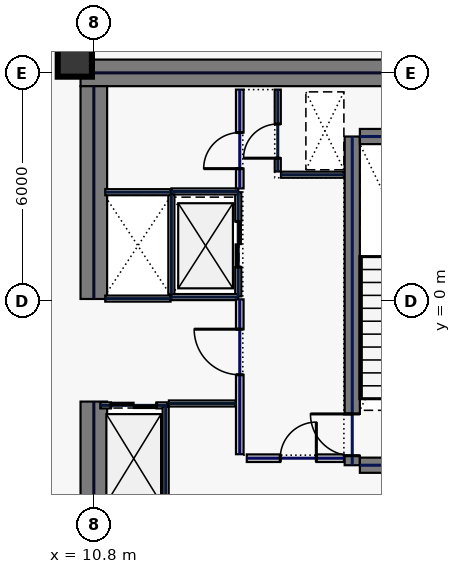
"""IFC4 building model, lengths in metres.
Left out: names, types, materials, properties, quantities, classifications, styles, units other than length and angle.
Written with IfcOpenShell. Run it as: python <this file> out.ifc"""

import sys

from ifc_helpers import new_model, si_unit, direction, frame, frame_2d, origin, origin_2d, place, context, subcontext, project, spatial, rectangle, hollow_rectangle, extrude, element, fill, save


model = new_model("IFC4")
c1 = context("Model", 3, precision=1e-05, world=origin(), true_north=direction((0.0, 1.0)))
c2 = subcontext(c1, "Body", "Model", "MODEL_VIEW")
j1 = project(units=[si_unit("LENGTHUNIT", "METRE"), si_unit("PLANEANGLEUNIT", "RADIAN")], contexts=[c1])
p1 = place(None, origin())
s1 = spatial("IfcSite", under=j1, at=p1, CompositionType="ELEMENT")
p2 = place(p1, origin())
s2 = spatial("IfcBuilding", under=s1, at=p2, CompositionType="ELEMENT")
p3 = place(p2, frame((0.0, 0.0, 176.2)))
s3 = spatial("IfcBuildingStorey", under=s2, at=p3, CompositionType="ELEMENT", Elevation=176.2)
p4 = place(p3, frame((10.45, 6.0, 0.0), z_axis=(0.0, 0.0, 1.0), x_axis=(1.0, 0.0, 0.0)))
e1 = element("IfcWall", 1, at=p4, inside=s3, PredefinedType="SHEAR", context=c2, shape_type="SweptSolid", body=[
    extrude(rectangle(XDim=11.55, YDim=0.7, at=frame_2d((5.775, 0.0))), origin(), (0.0, 0.0, 1.0), 3.74),
])
p5 = place(p3, frame((10.8, -5.65, 0.0), z_axis=(0.0, 0.0, 1.0), x_axis=(0.0, 1.0, 0.0)))
e2 = element("IfcWall", 2, at=p5, inside=s3, PredefinedType="SHEAR", context=c2, shape_type="SweptSolid", body=[
    extrude(rectangle(XDim=3.0, YDim=0.7, at=frame_2d((1.5, 0.0))), origin(), (0.0, 0.0, 1.0), 3.74),
])
p6 = place(p3, frame((10.8, 0.05, 0.0), z_axis=(0.0, 0.0, 1.0), x_axis=(0.0, 1.0, 0.0)))
e3 = element("IfcWall", 3, at=p6, inside=s3, PredefinedType="SHEAR", context=c2, shape_type="SweptSolid", body=[
    extrude(rectangle(XDim=5.6, YDim=0.7, at=frame_2d((2.8, 0.0))), origin(), (0.0, 0.0, 1.0), 3.74),
])
p7 = place(p3, frame((17.6, -4.325, 0.0), z_axis=(0.0, 0.0, 1.0), x_axis=(0.0, 1.0, 0.0)))
e4 = element("IfcWall", 4, at=p7, inside=s3, PredefinedType="SHEAR", context=c2, shape_type="SweptSolid", body=[
    extrude(rectangle(XDim=8.65, YDim=0.4, at=frame_2d((4.325, 0.0))), origin(), (0.0, 0.0, 1.0), 3.74),
])
p8 = place(p7, frame((0.25, 0.0, 0.0)))
e5 = element("IfcOpeningElement", 5, at=p8, cuts=e4, PredefinedType="OPENING", context=c2, shape_type="SweptSolid", body=[
    extrude(rectangle(XDim=1.1, YDim=2.2, at=frame_2d((0.55, 1.1))), frame((0.0, 0.21, 0.0), z_axis=(0.0, -1.0, 0.0), x_axis=(1.0, 0.0, 0.0)), (0.0, 0.0, 1.0), 0.42),
])
for number, where, z_axis, x_axis in (
    (6, (17.8, -4.325, 0.0), (0.0, 0.0, 1.0), (1.0, 0.0, 0.0)),
    (7, (17.8, 4.325, 0.0), (0.0, 0.0, 1.0), (1.0, 0.0, 0.0)),
):
    element("IfcWall", number, at=place(p3, frame(where, z_axis=z_axis, x_axis=x_axis)), inside=s3, PredefinedType="SHEAR", context=c2, shape_type="SweptSolid", body=[
        extrude(rectangle(XDim=3.4, YDim=0.4, at=frame_2d((1.7, 0.0))), origin(), (0.0, 0.0, 1.0), 3.74),
    ])
p9 = place(p3, frame((10.3, 6.35, 0.0), z_axis=(0.0, 0.0, 1.0), x_axis=(1.0, 0.0, 0.0)))
e8 = element("IfcColumn", 8, at=p9, inside=s3, PredefinedType="COLUMN", context=c2, shape_type="SweptSolid", body=[
    extrude(hollow_rectangle(XDim=0.9, YDim=0.9, WallThickness=0.04, at=origin_2d()), origin(), (0.0, 0.0, 1.0), 3.74),
])
p10 = place(p3, frame((14.6, 0.12, 0.0), z_axis=(0.0, 0.0, 1.0), x_axis=(0.0, 1.0, 0.0)))
e9 = element("IfcWall", 9, at=p10, inside=s3, PredefinedType="PARTITIONING", context=c2, shape_type="SweptSolid", body=[
    extrude(rectangle(XDim=2.74, YDim=0.16, at=frame_2d((1.37, 0.0))), origin(), (0.0, 0.0, 1.0), 3.74),
])
p11 = place(p10, frame((0.77, 0.0, 0.0)))
e10 = element("IfcOpeningElement", 10, at=p11, cuts=e9, PredefinedType="OPENING", context=c2, shape_type="SweptSolid", body=[
    extrude(rectangle(XDim=1.2, YDim=2.2, at=frame_2d((0.6, 1.1))), frame((0.0, 0.09, 0.0), z_axis=(0.0, -1.0, 0.0), x_axis=(1.0, 0.0, 0.0)), (0.0, 0.0, 1.0), 0.18),
])
for number, where, z_axis, x_axis in (
    (11, (12.84, 0.1, 0.0), (0.0, 0.0, 1.0), (1.0, 0.0, 0.0)),
    (12, (12.84, 2.88, 0.0), (0.0, 0.0, 1.0), (1.0, 0.0, 0.0)),
):
    element("IfcWall", number, at=place(p3, frame(where, z_axis=z_axis, x_axis=x_axis)), inside=s3, PredefinedType="PARTITIONING", context=c2, shape_type="SweptSolid", body=[
        extrude(rectangle(XDim=1.76, YDim=0.16, at=frame_2d((0.88, 0.0))), origin(), (0.0, 0.0, 1.0), 3.74),
    ])
p12 = place(p3, frame((12.84, 0.18, 0.0), z_axis=(0.0, 0.0, 1.0), x_axis=(0.0, 1.0, 0.0)))
e13 = element("IfcWall", 13, at=p12, inside=s3, PredefinedType="PARTITIONING", context=c2, shape_type="SweptSolid", body=[
    extrude(rectangle(XDim=2.62, YDim=0.16, at=frame_2d((1.31, 0.0))), origin(), (0.0, 0.0, 1.0), 3.74),
])
p13 = place(p3, frame((10.97, -2.75, 0.0), z_axis=(0.0, 0.0, 1.0), x_axis=(1.0, 0.0, 0.0)))
e14 = element("IfcWall", 14, at=p13, inside=s3, PredefinedType="PARTITIONING", context=c2, shape_type="SweptSolid", body=[
    extrude(rectangle(XDim=1.76, YDim=0.16, at=frame_2d((0.88, 0.0))), origin(), (0.0, 0.0, 1.0), 3.74),
])
p14 = place(p13, frame((0.28, 0.0, 0.0)))
e15 = element("IfcOpeningElement", 15, at=p14, cuts=e14, PredefinedType="OPENING", context=c2, shape_type="SweptSolid", body=[
    extrude(rectangle(XDim=1.2, YDim=2.2, at=frame_2d((0.6, 1.1))), frame((0.0, 0.09, 0.0), z_axis=(0.0, -1.0, 0.0), x_axis=(1.0, 0.0, 0.0)), (0.0, 0.0, 1.0), 0.18),
])
for number, where, z_axis, x_axis in (
    (16, (11.1, 0.06, 0.0), (0.0, 0.0, 1.0), (1.0, 0.0, 0.0)),
    (17, (11.1, 2.86, 0.0), (0.0, 0.0, 1.0), (1.0, 0.0, 0.0)),
):
    element("IfcWall", number, at=place(p3, frame(where, z_axis=z_axis, x_axis=x_axis)), inside=s3, PredefinedType="PARTITIONING", context=c2, shape_type="SweptSolid", body=[
        extrude(rectangle(XDim=1.72, YDim=0.16, at=frame_2d((0.86, 0.0))), origin(), (0.0, 0.0, 1.0), 3.74),
    ])
p15 = place(p3, frame((15.64, 3.405, 0.0), z_axis=(0.0, 0.0, 1.0), x_axis=(0.0, 1.0, 0.0)))
e18 = element("IfcWall", 18, at=p15, inside=s3, PredefinedType="PARTITIONING", context=c2, shape_type="SweptSolid", body=[
    extrude(rectangle(XDim=2.155, YDim=0.16, at=frame_2d((1.078, 0.0))), origin(), (0.0, 0.0, 1.0), 3.74),
])
p16 = place(p15, frame((0.35, 0.0, 0.0)))
e19 = element("IfcOpeningElement", 19, at=p16, cuts=e18, PredefinedType="OPENING", context=c2, shape_type="SweptSolid", body=[
    extrude(rectangle(XDim=0.9, YDim=2.2, at=frame_2d((0.45, 1.1))), frame((0.0, 0.09, 0.0), z_axis=(0.0, -1.0, 0.0), x_axis=(1.0, 0.0, 0.0)), (0.0, 0.0, 1.0), 0.18),
])
p17 = place(p3, frame((15.725, 3.32, 0.0), z_axis=(0.0, 0.0, 1.0), x_axis=(1.0, 0.0, 0.0)))
e20 = element("IfcWall", 20, at=p17, inside=s3, PredefinedType="PARTITIONING", context=c2, shape_type="SweptSolid", body=[
    extrude(rectangle(XDim=1.655, YDim=0.16, at=frame_2d((0.827, 0.0))), origin(), (0.0, 0.0, 1.0), 3.74),
])
p18 = place(p3, frame((14.825, -4.14, 0.0), z_axis=(0.0, 0.0, 1.0), x_axis=(1.0, 0.0, 0.0)))
e21 = element("IfcWall", 21, at=p18, inside=s3, PredefinedType="SOLIDWALL", context=c2, shape_type="SweptSolid", body=[
    extrude(rectangle(XDim=2.555, YDim=0.2, at=frame_2d((1.277, 0.0))), origin(), (0.0, 0.0, 1.0), 3.74),
])
p19 = place(p18, frame((0.88, 0.0, 0.0)))
e22 = element("IfcOpeningElement", 22, at=p19, cuts=e21, PredefinedType="OPENING", context=c2, shape_type="SweptSolid", body=[
    extrude(rectangle(XDim=0.95, YDim=2.2, at=frame_2d((0.475, 1.1))), frame((0.0, 0.11, 0.0), z_axis=(0.0, -1.0, 0.0), x_axis=(1.0, 0.0, 0.0)), (0.0, 0.0, 1.0), 0.22),
])
p20 = place(p3, frame((12.775, -2.7, 0.0), z_axis=(0.0, 0.0, 1.0), x_axis=(1.0, 0.0, 0.0)))
e23 = element("IfcWall", 23, at=p20, inside=s3, PredefinedType="PARTITIONING", context=c2, shape_type="SweptSolid", body=[
    extrude(rectangle(XDim=1.76, YDim=0.16, at=frame_2d((0.88, 0.0))), origin(), (0.0, 0.0, 1.0), 3.74),
])
p21 = place(p3, frame((12.69, -5.56, 0.0), z_axis=(0.0, 0.0, 1.0), x_axis=(0.0, 1.0, 0.0)))
e24 = element("IfcWall", 24, at=p21, inside=s3, PredefinedType="PARTITIONING", context=c2, shape_type="SweptSolid", body=[
    extrude(rectangle(XDim=2.775, YDim=0.16, at=frame_2d((1.388, 0.0))), origin(), (0.0, 0.0, 1.0), 3.74),
])
p22 = place(p3, frame((14.64, 2.96, 0.0), z_axis=(0.0, 0.0, 1.0), x_axis=(0.0, 1.0, 0.0)))
e25 = element("IfcWall", 25, at=p22, inside=s3, PredefinedType="SOLIDWALL", context=c2, shape_type="SweptSolid", body=[
    extrude(rectangle(XDim=2.6, YDim=0.2, at=frame_2d((1.3, 0.0))), origin(), (0.0, 0.0, 1.0), 3.74),
])
p23 = place(p22, frame((0.52, 0.0, 0.0)))
e26 = element("IfcOpeningElement", 26, at=p23, cuts=e25, PredefinedType="OPENING", context=c2, shape_type="SweptSolid", body=[
    extrude(rectangle(XDim=0.95, YDim=2.2, at=frame_2d((0.475, 1.1))), frame((0.0, 0.11, 0.0), z_axis=(0.0, -1.0, 0.0), x_axis=(1.0, 0.0, 0.0)), (0.0, 0.0, 1.0), 0.22),
])
p24 = place(p3, frame((14.64, -4.035, 0.0), z_axis=(0.0, 0.0, 1.0), x_axis=(0.0, 1.0, 0.0)))
e27 = element("IfcWall", 27, at=p24, inside=s3, PredefinedType="SOLIDWALL", context=c2, shape_type="SweptSolid", body=[
    extrude(rectangle(XDim=4.075, YDim=0.2, at=frame_2d((2.038, 0.0))), origin(), (0.0, 0.0, 1.0), 3.74),
])
p25 = place(p24, frame((2.09, 0.0, 0.0)))
e28 = element("IfcOpeningElement", 28, at=p25, cuts=e27, PredefinedType="OPENING", context=c2, shape_type="SweptSolid", body=[
    extrude(rectangle(XDim=1.2, YDim=2.2, at=frame_2d((0.6, 1.1))), frame((0.0, 0.11, 0.0), z_axis=(0.0, -1.0, 0.0), x_axis=(1.0, 0.0, 0.0)), (0.0, 0.0, 1.0), 0.22),
])
p26 = place(p8, origin())
e29 = element("IfcDoor", 29, at=p26, inside=s3, OperationType="SINGLE_SWING_RIGHT", PredefinedType="DOOR", context=c2, shape_type="SweptSolid", body=[
    extrude(rectangle(XDim=1.1, YDim=2.2, at=frame_2d((0.55, 1.1))), frame((0.0, 0.025, 0.0), z_axis=(0.0, -1.0, 0.0), x_axis=(1.0, 0.0, 0.0)), (0.0, 0.0, 1.0), 0.05),
])
fill(e5, e29)
p27 = place(p11, origin())
e30 = element("IfcDoor", 30, at=p27, inside=s3, OperationType="SLIDING_TO_LEFT", PredefinedType="DOOR", context=c2, shape_type="SweptSolid", body=[
    extrude(rectangle(XDim=1.2, YDim=2.2, at=frame_2d((0.6, 1.1))), frame((0.0, 0.025, 0.0), z_axis=(0.0, -1.0, 0.0), x_axis=(1.0, 0.0, 0.0)), (0.0, 0.0, 1.0), 0.05),
])
fill(e10, e30)
p28 = place(p14, origin())
e31 = element("IfcDoor", 31, at=p28, inside=s3, OperationType="SLIDING_TO_LEFT", PredefinedType="DOOR", context=c2, shape_type="SweptSolid", body=[
    extrude(rectangle(XDim=1.2, YDim=2.2, at=frame_2d((0.6, 1.1))), frame((0.0, 0.025, 0.0), z_axis=(0.0, -1.0, 0.0), x_axis=(1.0, 0.0, 0.0)), (0.0, 0.0, 1.0), 0.05),
])
fill(e15, e31)
p29 = place(p16, origin())
e32 = element("IfcDoor", 32, at=p29, inside=s3, OperationType="SINGLE_SWING_LEFT", PredefinedType="DOOR", context=c2, shape_type="SweptSolid", body=[
    extrude(rectangle(XDim=0.9, YDim=2.2, at=frame_2d((0.45, 1.1))), frame((0.0, 0.025, 0.0), z_axis=(0.0, -1.0, 0.0), x_axis=(1.0, 0.0, 0.0)), (0.0, 0.0, 1.0), 0.05),
])
fill(e19, e32)
p30 = place(p19, origin())
e33 = element("IfcDoor", 33, at=p30, inside=s3, OperationType="SINGLE_SWING_RIGHT", PredefinedType="DOOR", context=c2, shape_type="SweptSolid", body=[
    extrude(rectangle(XDim=0.95, YDim=2.2, at=frame_2d((0.475, 1.1))), frame((0.0, 0.025, 0.0), z_axis=(0.0, -1.0, 0.0), x_axis=(1.0, 0.0, 0.0)), (0.0, 0.0, 1.0), 0.05),
])
fill(e22, e33)
p31 = place(p23, origin())
e34 = element("IfcDoor", 34, at=p31, inside=s3, OperationType="SINGLE_SWING_LEFT", PredefinedType="DOOR", context=c2, shape_type="SweptSolid", body=[
    extrude(rectangle(XDim=0.95, YDim=2.2, at=frame_2d((0.475, 1.1))), frame((0.0, 0.025, 0.0), z_axis=(0.0, -1.0, 0.0), x_axis=(1.0, 0.0, 0.0)), (0.0, 0.0, 1.0), 0.05),
])
fill(e26, e34)
p32 = place(p25, origin())
e35 = element("IfcDoor", 35, at=p32, inside=s3, OperationType="SINGLE_SWING_RIGHT", PredefinedType="DOOR", context=c2, shape_type="SweptSolid", body=[
    extrude(rectangle(XDim=1.2, YDim=2.2, at=frame_2d((0.6, 1.1))), frame((0.0, 0.025, 0.0), z_axis=(0.0, -1.0, 0.0), x_axis=(1.0, 0.0, 0.0)), (0.0, 0.0, 1.0), 0.05),
])
fill(e28, e35)
save(model, sys.argv[1])
